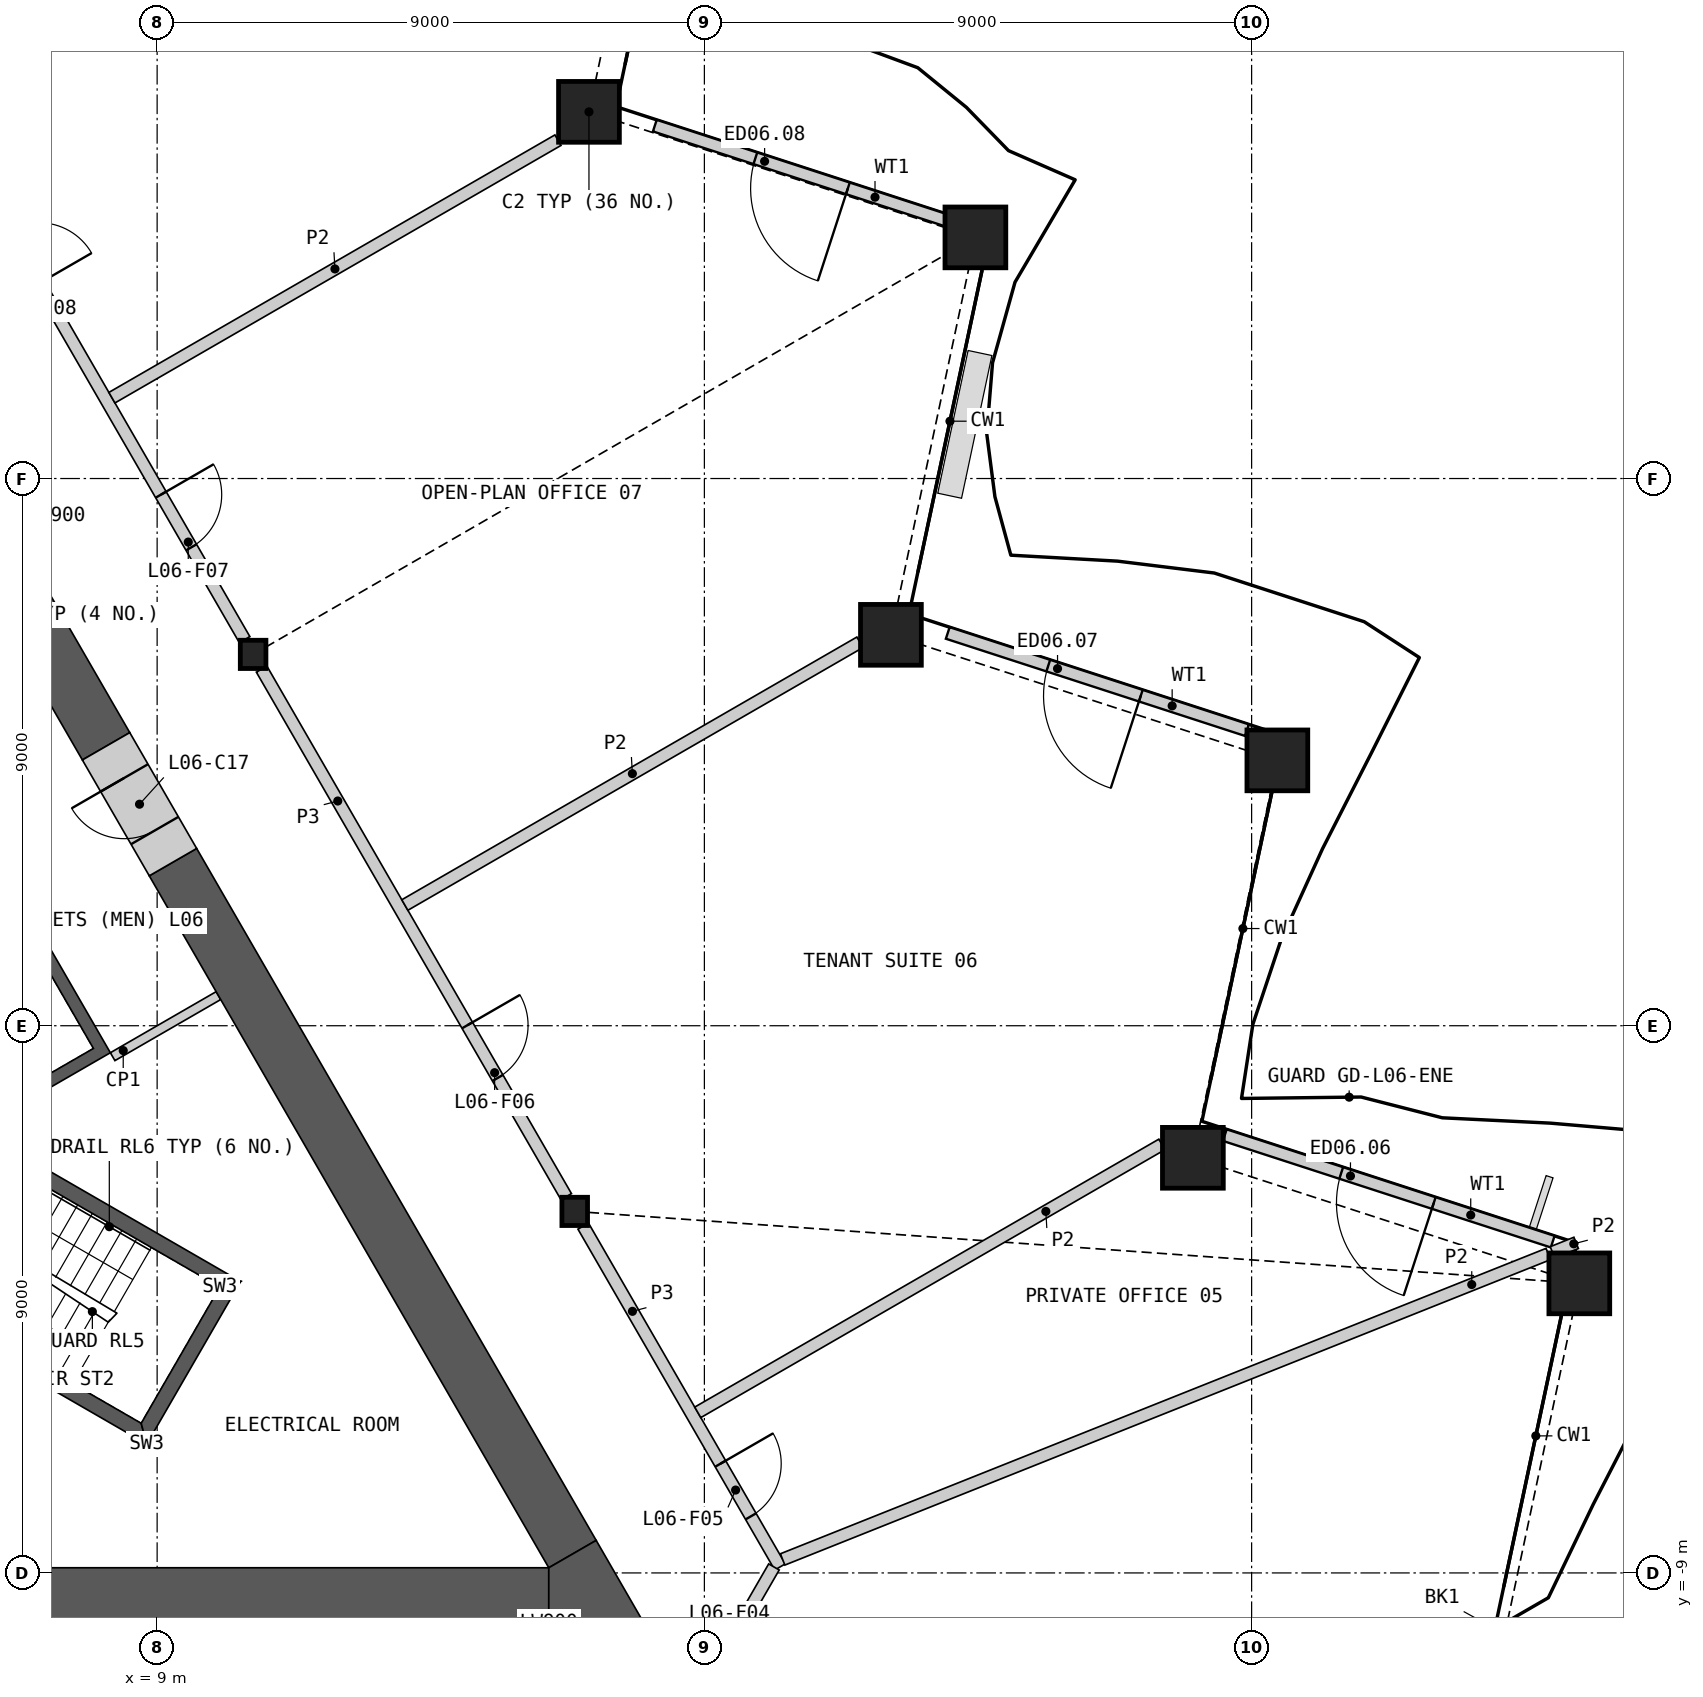
"""IFC4 building model, lengths in metres.
Left out: names, types, materials, properties, quantities, classifications, styles, units other than length and angle.
Written with IfcOpenShell. Run it as: python <this file> out.ifc"""

import sys

from ifc_helpers import new_model, si_unit, direction, frame, frame_2d, origin, origin_2d, place, context, subcontext, project, spatial, polyline, rectangle, hollow_rectangle, i_section, outline, extrude, element, fill, save


model = new_model("IFC4")
c1 = context("Model", 3, precision=1e-05, world=origin(), true_north=direction((0.0, 1.0)))
c2 = subcontext(c1, "Body", "Model", "MODEL_VIEW")
j1 = project(units=[si_unit("LENGTHUNIT", "METRE"), si_unit("PLANEANGLEUNIT", "RADIAN")], contexts=[c1])
p1 = place(None, origin())
s1 = spatial("IfcSite", under=j1, at=p1, CompositionType="ELEMENT")
p2 = place(p1, origin())
s2 = spatial("IfcBuilding", under=s1, at=p2, CompositionType="ELEMENT")
p3 = place(p2, frame((0.0, 0.0, 34.2)))
s3 = spatial("IfcBuildingStorey", under=s2, at=p3, CompositionType="ELEMENT", Elevation=34.2)
for number, where, z_axis, x_axis in (
    (1, (32.389, -4.237, 0.0), (0.0, 0.0, 1.0), (1.0, 0.0, 0.0)),
    (2, (26.034, -2.172, 0.0), (0.0, 0.0, 1.0), (1.0, 0.0, 0.0)),
    (3, (27.423, 4.364, 0.0), (0.0, 0.0, 1.0), (1.0, 0.0, 0.0)),
    (4, (21.068, 6.429, 0.0), (0.0, 0.0, 1.0), (1.0, 0.0, 0.0)),
    (5, (22.457, 12.966, 0.0), (0.0, 0.0, 1.0), (1.0, 0.0, 0.0)),
    (6, (16.102, 15.031, 0.0), (0.0, 0.0, 1.0), (1.0, 0.0, 0.0)),
):
    element("IfcColumn", number, at=place(p3, frame(where, z_axis=z_axis, x_axis=x_axis)), inside=s3, PredefinedType="COLUMN", context=c2, shape_type="SweptSolid", body=[
        extrude(hollow_rectangle(XDim=1.0, YDim=1.0, WallThickness=0.07, at=origin_2d()), origin(), (0.0, 0.0, 1.0), 4.2),
    ])
for number, where, z_axis, x_axis in (
    (7, (15.868, -3.054, 0.0), (0.0, 0.0, 1.0), (1.0, 0.0, 0.0)),
    (8, (10.578, 6.107, 0.0), (0.0, 0.0, 1.0), (1.0, 0.0, 0.0)),
):
    element("IfcColumn", number, at=place(p3, frame(where, z_axis=z_axis, x_axis=x_axis)), inside=s3, PredefinedType="COLUMN", context=c2, shape_type="SweptSolid", body=[
        extrude(i_section(OverallWidth=0.421, OverallDepth=0.465, WebThickness=0.045, FlangeThickness=0.072, at=origin_2d()), origin(), (0.0, 0.0, 1.0), 4.2),
    ])
p4 = place(p3, frame((31.952, -3.552, 0.0), z_axis=(0.0, 0.0, 1.0), x_axis=(-0.951049886998, 0.309037396509, 0.0)))
e9 = element("IfcWall", 9, at=p4, inside=s3, PredefinedType="SOLIDWALL", context=c2, shape_type="SweptSolid", body=[
    extrude(rectangle(XDim=5.671, YDim=0.2, at=frame_2d((2.835, 0.0))), origin(), (0.0, 0.0, 1.0), 3.189),
])
p5 = place(p4, frame((2.057, 0.0, 0.0)))
e10 = element("IfcOpeningElement", 10, at=p5, cuts=e9, PredefinedType="OPENING", context=c2, shape_type="SweptSolid", body=[
    extrude(rectangle(XDim=1.6, YDim=2.4, at=frame_2d((0.8, 1.2))), frame((0.0, 0.11, 0.0), z_axis=(0.0, -1.0, 0.0), x_axis=(1.0, 0.0, 0.0)), (0.0, 0.0, 1.0), 0.22),
])
p6 = place(p3, frame((26.923, 4.861, 0.0), z_axis=(0.0, 0.0, 1.0), x_axis=(-0.951053139094, 0.309027388138, 0.0)))
e11 = element("IfcWall", 11, at=p6, inside=s3, PredefinedType="SOLIDWALL", context=c2, shape_type="SweptSolid", body=[
    extrude(rectangle(XDim=5.174, YDim=0.2, at=frame_2d((2.587, 0.0))), origin(), (0.0, 0.0, 1.0), 3.189),
])
p7 = place(p6, frame((1.836, 0.0, 0.0)))
e12 = element("IfcOpeningElement", 12, at=p7, cuts=e11, PredefinedType="OPENING", context=c2, shape_type="SweptSolid", body=[
    extrude(rectangle(XDim=1.6, YDim=2.4, at=frame_2d((0.8, 1.2))), frame((0.0, 0.11, 0.0), z_axis=(0.0, -1.0, 0.0), x_axis=(1.0, 0.0, 0.0)), (0.0, 0.0, 1.0), 0.22),
])
p8 = place(p3, frame((22.013, 13.235, 0.0), z_axis=(0.0, 0.0, 1.0), x_axis=(-0.951051031059, 0.309033875687, 0.0)))
e13 = element("IfcWall", 13, at=p8, inside=s3, PredefinedType="SOLIDWALL", context=c2, shape_type="SweptSolid", body=[
    extrude(rectangle(XDim=5.077, YDim=0.2, at=frame_2d((2.538, 0.0))), origin(), (0.0, 0.0, 1.0), 3.189),
])
p9 = place(p8, frame((1.738, 0.0, 0.0)))
e14 = element("IfcOpeningElement", 14, at=p9, cuts=e13, PredefinedType="OPENING", context=c2, shape_type="SweptSolid", body=[
    extrude(rectangle(XDim=1.6, YDim=2.4, at=frame_2d((0.8, 1.2))), frame((0.0, 0.11, 0.0), z_axis=(0.0, -1.0, 0.0), x_axis=(1.0, 0.0, 0.0)), (0.0, 0.0, 1.0), 0.22),
])
p10 = place(p3, origin())
e15 = element("IfcWall", 15, at=p10, inside=s3, PredefinedType="SHEAR", context=c2, shape_type="SweptSolid", body=[
    extrude(outline(polyline([(2.66, 4.192), (4.831, 5.445), (8.231, -0.444), (6.061, -1.697), (5.96, -1.524), (7.952, -0.374), (6.952, 1.358), (4.96, 0.208), (4.861, 0.381), (6.852, 1.531), (5.852, 3.263), (3.861, 2.113), (3.76, 2.287), (5.752, 3.437), (4.752, 5.169), (2.76, 4.019), (2.66, 4.192)])), origin(), (0.0, 0.0, 1.0), 3.8),
])
p11 = place(p3, origin())
e16 = element("IfcWall", 16, at=p11, inside=s3, PredefinedType="SHEAR", context=c2, shape_type="SweptSolid", body=[
    extrude(outline(polyline([(3.763, -3.956), (8.83, -6.881), (8.738, -6.539), (3.888, -3.739), (3.763, -3.956)])), origin(), (0.0, 0.0, 1.0), 3.8),
])
p12 = place(p3, origin())
e17 = element("IfcWall", 17, at=p12, inside=s3, PredefinedType="SHEAR", context=c2, shape_type="SweptSolid", body=[
    extrude(outline(polyline([(8.83, -6.881), (10.374, -4.206), (10.032, -4.298), (8.738, -6.539), (8.83, -6.881)])), origin(), (0.0, 0.0, 1.0), 3.8),
])
p13 = place(p3, origin())
e18 = element("IfcWall", 18, at=p13, inside=s3, PredefinedType="SHEAR", context=c2, shape_type="SweptSolid", body=[
    extrude(outline(polyline([(10.032, -4.298), (10.374, -4.206), (5.307, -1.281), (5.182, -1.498), (10.032, -4.298)])), origin(), (0.0, 0.0, 1.0), 3.8),
])
p14 = place(p3, frame((8.268, -0.509, 0.0), z_axis=(0.0, 0.0, 1.0), x_axis=(0.866035824272, 0.499981950752, 0.0)))
e19 = element("IfcWall", 19, at=p14, inside=s3, PredefinedType="PARTITIONING", context=c2, shape_type="SweptSolid", body=[
    extrude(rectangle(XDim=2.009, YDim=0.15, at=frame_2d((1.004, 0.0))), origin(), (0.0, 0.0, 1.0), 3.8),
])
p15 = place(p3, frame((6.571, -9.365, 0.0), z_axis=(0.0, 0.0, 1.0), x_axis=(1.0, 0.0, 0.0)))
e20 = element("IfcWall", 20, at=p15, inside=s3, PredefinedType="SHEAR", context=c2, shape_type="SweptSolid", body=[
    extrude(rectangle(XDim=8.871, YDim=0.9, at=frame_2d((4.435, 0.0))), origin(), (0.0, 0.0, 1.0), 3.8),
])
p16 = place(p3, frame((15.831, -8.69, 0.0), z_axis=(0.0, 0.0, 1.0), x_axis=(-0.499997452939, 0.866026874326, 0.0)))
e21 = element("IfcWall", 21, at=p16, inside=s3, PredefinedType="SHEAR", context=c2, shape_type="SweptSolid", body=[
    extrude(rectangle(XDim=13.141, YDim=0.9, at=frame_2d((6.571, 0.0))), origin(), (0.0, 0.0, 1.0), 3.8),
])
p17 = place(p3, frame((8.16, 4.596, 0.0), z_axis=(0.0, 0.0, 1.0), x_axis=(-0.500012259336, 0.866018325738, 0.0)))
e22 = element("IfcWall", 22, at=p17, inside=s3, PredefinedType="SHEAR", context=c2, shape_type="SweptSolid", body=[
    extrude(rectangle(XDim=7.389, YDim=0.9, at=frame_2d((3.695, 0.0))), origin(), (0.0, 0.0, 1.0), 3.8),
])
p18 = place(p3, origin())
e23 = element("IfcWall", 23, at=p18, inside=s3, PredefinedType="SHEAR", context=c2, shape_type="SweptSolid", body=[
    extrude(outline(polyline([(15.441, -9.815), (15.441, -8.915), (16.221, -8.465), (17.0, -9.815), (15.441, -9.815)])), origin(), (0.0, 0.0, 1.0), 3.8),
])
p19 = place(p3, frame((9.26, 2.691, 0.0), z_axis=(0.0, 0.0, 1.0), x_axis=(-0.499946605688, 0.86605622881, 0.0)))
e24 = element("IfcWall", 24, at=p19, inside=s3, PredefinedType="SHEAR", context=c2, shape_type="SweptSolid", body=[
    extrude(rectangle(XDim=2.2, YDim=0.9, at=frame_2d((1.1, 0.0))), origin(), (0.0, 0.0, 1.0), 3.8),
])
p20 = place(p19, frame((0.6, 0.0, 0.0)))
e25 = element("IfcOpeningElement", 25, at=p20, cuts=e24, PredefinedType="OPENING", context=c2, shape_type="SweptSolid", body=[
    extrude(rectangle(XDim=1.0, YDim=2.1, at=frame_2d((0.5, 1.05))), frame((0.0, 0.46, 0.0), z_axis=(0.0, -1.0, 0.0), x_axis=(1.0, 0.0, 0.0)), (0.0, 0.0, 1.0), 0.92),
])
p21 = place(p3, frame((5.429, 15.026, 0.0), z_axis=(0.0, 0.0, 1.0), x_axis=(0.50001002959, -0.86601961312, 0.0)))
e26 = element("IfcWall", 26, at=p21, inside=s3, PredefinedType="PARTITIONING", context=c2, shape_type="SweptSolid", body=[
    extrude(rectangle(XDim=10.019, YDim=0.2, at=frame_2d((5.009, 0.0))), origin(), (0.0, 0.0, 1.0), 3.8),
])
p22 = place(p21, frame((7.266, 0.0, 0.0)))
e27 = element("IfcOpeningElement", 27, at=p22, cuts=e26, PredefinedType="OPENING", context=c2, shape_type="SweptSolid", body=[
    extrude(rectangle(XDim=1.0, YDim=2.1, at=frame_2d((0.5, 1.05))), frame((0.0, 0.11, 0.0), z_axis=(0.0, -1.0, 0.0), x_axis=(1.0, 0.0, 0.0)), (0.0, 0.0, 1.0), 0.22),
])
p23 = place(p21, frame((2.254, 0.0, 0.0)))
e28 = element("IfcOpeningElement", 28, at=p23, cuts=e26, PredefinedType="OPENING", context=c2, shape_type="SweptSolid", body=[
    extrude(rectangle(XDim=1.0, YDim=2.1, at=frame_2d((0.5, 1.05))), frame((0.0, 0.11, 0.0), z_axis=(0.0, -1.0, 0.0), x_axis=(1.0, 0.0, 0.0)), (0.0, 0.0, 1.0), 0.22),
])
p24 = place(p3, frame((10.719, 5.865, 0.0), z_axis=(0.0, 0.0, 1.0), x_axis=(0.49999175339, -0.866030164915, 0.0)))
e29 = element("IfcWall", 29, at=p24, inside=s3, PredefinedType="PARTITIONING", context=c2, shape_type="SweptSolid", body=[
    extrude(rectangle(XDim=10.019, YDim=0.2, at=frame_2d((5.009, 0.0))), origin(), (0.0, 0.0, 1.0), 3.8),
])
p25 = place(p24, frame((6.764, 0.0, 0.0)))
e30 = element("IfcOpeningElement", 30, at=p25, cuts=e29, PredefinedType="OPENING", context=c2, shape_type="SweptSolid", body=[
    extrude(rectangle(XDim=1.0, YDim=2.1, at=frame_2d((0.5, 1.05))), frame((0.0, 0.11, 0.0), z_axis=(0.0, -1.0, 0.0), x_axis=(1.0, 0.0, 0.0)), (0.0, 0.0, 1.0), 0.22),
])
p26 = place(p3, frame((16.008, -3.296, 0.0), z_axis=(0.0, 0.0, 1.0), x_axis=(0.499984737558, -0.86603421538, 0.0)))
e31 = element("IfcWall", 31, at=p26, inside=s3, PredefinedType="PARTITIONING", context=c2, shape_type="SweptSolid", body=[
    extrude(rectangle(XDim=6.473, YDim=0.2, at=frame_2d((3.236, 0.0))), origin(), (0.0, 0.0, 1.0), 3.8),
])
p27 = place(p26, frame((4.512, 0.0, 0.0)))
e32 = element("IfcOpeningElement", 32, at=p27, cuts=e31, PredefinedType="OPENING", context=c2, shape_type="SweptSolid", body=[
    extrude(rectangle(XDim=1.0, YDim=2.1, at=frame_2d((0.5, 1.05))), frame((0.0, 0.11, 0.0), z_axis=(0.0, -1.0, 0.0), x_axis=(1.0, 0.0, 0.0)), (0.0, 0.0, 1.0), 0.22),
])
p28 = place(p3, frame((17.281, -12.128, 0.0), z_axis=(0.0, 0.0, 1.0), x_axis=(0.499958791762, 0.866049194065, 0.0)))
e33 = element("IfcWall", 33, at=p28, inside=s3, PredefinedType="PARTITIONING", context=c2, shape_type="SweptSolid", body=[
    extrude(rectangle(XDim=3.726, YDim=0.2, at=frame_2d((1.863, 0.0))), origin(), (0.0, 0.0, 1.0), 3.8),
])
p29 = place(p28, frame((1.363, 0.0, 0.0)))
e34 = element("IfcOpeningElement", 34, at=p29, cuts=e33, PredefinedType="OPENING", context=c2, shape_type="SweptSolid", body=[
    extrude(rectangle(XDim=1.0, YDim=2.1, at=frame_2d((0.5, 1.05))), frame((0.0, 0.11, 0.0), z_axis=(0.0, -1.0, 0.0), x_axis=(1.0, 0.0, 0.0)), (0.0, 0.0, 1.0), 0.22),
])
p30 = place(p3, frame((19.287, -8.778, 0.0), z_axis=(0.0, 0.0, 1.0), x_axis=(0.928821541656, 0.370527385973, 0.0)))
e35 = element("IfcWall", 35, at=p30, inside=s3, PredefinedType="PARTITIONING", context=c2, shape_type="SweptSolid", body=[
    extrude(rectangle(XDim=13.558, YDim=0.2, at=frame_2d((6.779, 0.0))), origin(), (0.0, 0.0, 1.0), 2.885),
])
p31 = place(p3, frame((17.891, -6.359, 0.0), z_axis=(0.0, 0.0, 1.0), x_axis=(0.866021822855, 0.500006202301, 0.0)))
e36 = element("IfcWall", 36, at=p31, inside=s3, PredefinedType="PARTITIONING", context=c2, shape_type="SweptSolid", body=[
    extrude(rectangle(XDim=8.813, YDim=0.2, at=frame_2d((4.407, 0.0))), origin(), (0.0, 0.0, 1.0), 2.885),
])
p32 = place(p3, frame((13.074, 1.985, 0.0), z_axis=(0.0, 0.0, 1.0), x_axis=(0.86602139752, 0.500006938989, 0.0)))
e37 = element("IfcWall", 37, at=p32, inside=s3, PredefinedType="PARTITIONING", context=c2, shape_type="SweptSolid", body=[
    extrude(rectangle(XDim=8.642, YDim=0.2, at=frame_2d((4.321, 0.0))), origin(), (0.0, 0.0, 1.0), 2.885),
])
p33 = place(p3, frame((8.256, 10.33, 0.0), z_axis=(0.0, 0.0, 1.0), x_axis=(0.866026229868, 0.499998569178, 0.0)))
e38 = element("IfcWall", 38, at=p33, inside=s3, PredefinedType="PARTITIONING", context=c2, shape_type="SweptSolid", body=[
    extrude(rectangle(XDim=8.47, YDim=0.2, at=frame_2d((4.235, 0.0))), origin(), (0.0, 0.0, 1.0), 2.885),
])
p34 = place(p3, frame((31.948, -3.727, 0.0), z_axis=(0.0, 0.0, 1.0), x_axis=(0.928757356094, 0.370688243003, 0.0)))
e39 = element("IfcWall", 39, at=p34, inside=s3, PredefinedType="PARTITIONING", context=c2, shape_type="SweptSolid", body=[
    extrude(rectangle(XDim=0.419, YDim=0.2, at=frame_2d((0.21, 0.0))), origin(), (0.0, 0.0, 1.0), 2.885),
])
p35 = place(p5, origin())
e40 = element("IfcDoor", 40, at=p35, inside=s3, OperationType="DOUBLE_DOOR_SINGLE_SWING", PredefinedType="DOOR", context=c2, shape_type="SweptSolid", body=[
    extrude(rectangle(XDim=1.6, YDim=2.4, at=frame_2d((0.8, 1.2))), frame((0.0, 0.025, 0.0), z_axis=(0.0, -1.0, 0.0), x_axis=(1.0, 0.0, 0.0)), (0.0, 0.0, 1.0), 0.05),
])
fill(e10, e40)
p36 = place(p7, origin())
e41 = element("IfcDoor", 41, at=p36, inside=s3, OperationType="DOUBLE_DOOR_SINGLE_SWING", PredefinedType="DOOR", context=c2, shape_type="SweptSolid", body=[
    extrude(rectangle(XDim=1.6, YDim=2.4, at=frame_2d((0.8, 1.2))), frame((0.0, 0.025, 0.0), z_axis=(0.0, -1.0, 0.0), x_axis=(1.0, 0.0, 0.0)), (0.0, 0.0, 1.0), 0.05),
])
fill(e12, e41)
p37 = place(p9, origin())
e42 = element("IfcDoor", 42, at=p37, inside=s3, OperationType="DOUBLE_DOOR_SINGLE_SWING", PredefinedType="DOOR", context=c2, shape_type="SweptSolid", body=[
    extrude(rectangle(XDim=1.6, YDim=2.4, at=frame_2d((0.8, 1.2))), frame((0.0, 0.025, 0.0), z_axis=(0.0, -1.0, 0.0), x_axis=(1.0, 0.0, 0.0)), (0.0, 0.0, 1.0), 0.05),
])
fill(e14, e42)
p38 = place(p20, origin())
e43 = element("IfcDoor", 43, at=p38, inside=s3, OperationType="SINGLE_SWING_RIGHT", PredefinedType="DOOR", context=c2, shape_type="SweptSolid", body=[
    extrude(rectangle(XDim=1.0, YDim=2.1, at=frame_2d((0.5, 1.05))), frame((0.0, 0.205, 0.0), z_axis=(0.0, -1.0, 0.0), x_axis=(1.0, 0.0, 0.0)), (0.0, 0.0, 1.0), 0.05),
])
fill(e25, e43)
p39 = place(p27, origin())
e44 = element("IfcDoor", 44, at=p39, inside=s3, OperationType="SINGLE_SWING_LEFT", PredefinedType="DOOR", context=c2, shape_type="SweptSolid", body=[
    extrude(rectangle(XDim=1.0, YDim=2.1, at=frame_2d((0.5, 1.05))), frame((0.0, 0.025, 0.0), z_axis=(0.0, -1.0, 0.0), x_axis=(1.0, 0.0, 0.0)), (0.0, 0.0, 1.0), 0.05),
])
fill(e32, e44)
p40 = place(p25, origin())
e45 = element("IfcDoor", 45, at=p40, inside=s3, OperationType="SINGLE_SWING_LEFT", PredefinedType="DOOR", context=c2, shape_type="SweptSolid", body=[
    extrude(rectangle(XDim=1.0, YDim=2.1, at=frame_2d((0.5, 1.05))), frame((0.0, 0.025, 0.0), z_axis=(0.0, -1.0, 0.0), x_axis=(1.0, 0.0, 0.0)), (0.0, 0.0, 1.0), 0.05),
])
fill(e30, e45)
p41 = place(p22, origin())
e46 = element("IfcDoor", 46, at=p41, inside=s3, OperationType="SINGLE_SWING_LEFT", PredefinedType="DOOR", context=c2, shape_type="SweptSolid", body=[
    extrude(rectangle(XDim=1.0, YDim=2.1, at=frame_2d((0.5, 1.05))), frame((0.0, 0.025, 0.0), z_axis=(0.0, -1.0, 0.0), x_axis=(1.0, 0.0, 0.0)), (0.0, 0.0, 1.0), 0.05),
])
fill(e27, e46)
save(model, sys.argv[1])
